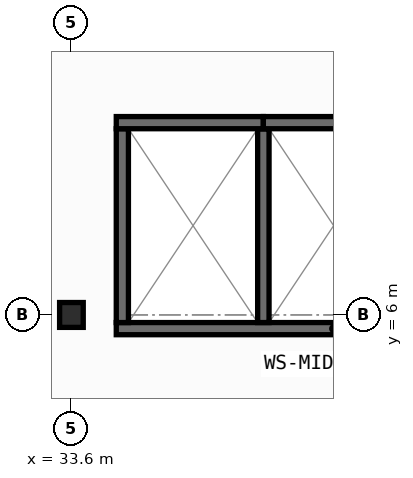
"""IFC4 building model, lengths in metres.
Left out: names, types, materials, properties, quantities, classifications, styles, units other than length and angle.
Written with IfcOpenShell. Run it as: python <this file> out.ifc"""

import sys

from ifc_helpers import new_model, si_unit, direction, frame, frame_2d, origin, origin_2d, place, context, subcontext, project, spatial, rectangle, i_section, extrude, element, save


model = new_model("IFC4")
c1 = context("Model", 3, precision=1e-05, world=origin(), true_north=direction((0.0, 1.0)))
c2 = subcontext(c1, "Body", "Model", "MODEL_VIEW")
j1 = project(units=[si_unit("LENGTHUNIT", "METRE"), si_unit("PLANEANGLEUNIT", "RADIAN")], contexts=[c1])
p1 = place(None, origin())
s1 = spatial("IfcSite", under=j1, at=p1, CompositionType="ELEMENT")
p2 = place(p1, origin())
s2 = spatial("IfcBuilding", under=s1, at=p2, CompositionType="ELEMENT")
p3 = place(p2, frame((0.0, 0.0, 69.9)))
s3 = spatial("IfcBuildingStorey", under=s2, at=p3, CompositionType="ELEMENT", Elevation=69.9)
p4 = place(p3, frame((33.6, 6.0, 0.0), z_axis=(0.0, 0.0, 1.0), x_axis=(1.0, 0.0, 0.0)))
e1 = element("IfcColumn", 1, at=p4, inside=s3, PredefinedType="COLUMN", context=c2, shape_type="SweptSolid", body=[
    extrude(i_section(OverallWidth=0.311, OverallDepth=0.327, WebThickness=0.016, FlangeThickness=0.025, FilletRadius=0.017, at=origin_2d()), origin(), (0.0, 0.0, 1.0), 3.95),
])
p5 = place(p3, frame((34.19, 5.82, 0.0), z_axis=(0.0, 0.0, 1.0), x_axis=(1.0, 0.0, 0.0)))
e2 = element("IfcWall", 2, at=p5, inside=s3, PredefinedType="SHEAR", context=c2, shape_type="SweptSolid", body=[
    extrude(rectangle(XDim=5.72, YDim=0.16, at=frame_2d((2.86, 0.0))), origin(), (0.0, 0.0, 1.0), 3.71),
])
p6 = place(p3, frame((34.27, 5.9, 0.0), z_axis=(0.0, 0.0, 1.0), x_axis=(0.0, 1.0, 0.0)))
e3 = element("IfcWall", 3, at=p6, inside=s3, PredefinedType="SHEAR", context=c2, shape_type="SweptSolid", body=[
    extrude(rectangle(XDim=2.55, YDim=0.16, at=frame_2d((1.275, 0.0))), origin(), (0.0, 0.0, 1.0), 3.71),
])
p7 = place(p3, frame((36.125, 5.9, 0.0), z_axis=(0.0, 0.0, 1.0), x_axis=(0.0, 1.0, 0.0)))
e4 = element("IfcWall", 4, at=p7, inside=s3, PredefinedType="SHEAR", context=c2, shape_type="SweptSolid", body=[
    extrude(rectangle(XDim=2.55, YDim=0.15, at=frame_2d((1.275, 0.0))), origin(), (0.0, 0.0, 1.0), 3.71),
])
p8 = place(p3, frame((34.19, 8.53, 0.0), z_axis=(0.0, 0.0, 1.0), x_axis=(1.0, 0.0, 0.0)))
e5 = element("IfcWall", 5, at=p8, inside=s3, PredefinedType="SHEAR", context=c2, shape_type="SweptSolid", body=[
    extrude(rectangle(XDim=1.935, YDim=0.16, at=frame_2d((0.968, 0.0))), origin(), (0.0, 0.0, 1.0), 3.71),
])
p9 = place(p3, frame((36.125, 8.53, 0.0), z_axis=(0.0, 0.0, 1.0), x_axis=(1.0, 0.0, 0.0)))
e6 = element("IfcWall", 6, at=p9, inside=s3, PredefinedType="SHEAR", context=c2, shape_type="SweptSolid", body=[
    extrude(rectangle(XDim=1.85, YDim=0.16, at=frame_2d((0.925, 0.0))), origin(), (0.0, 0.0, 1.0), 3.71),
])
save(model, sys.argv[1])
